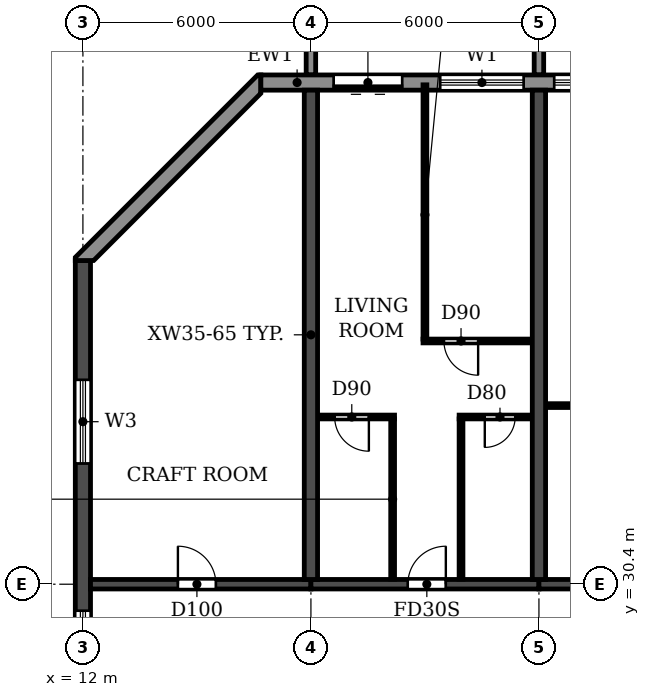
"""IFC4 building model, lengths in metres.
Left out: names, types, materials, properties, quantities, classifications, styles, units other than length and angle.
Written with IfcOpenShell. Run it as: python <this file> out.ifc"""

import sys

from ifc_helpers import new_model, si_unit, direction, frame, frame_2d, origin, place, context, subcontext, project, spatial, polyline, rectangle, outline, extrude, source, transform, mapped, element, fill, save


model = new_model("IFC4")
c1 = context("Model", 3, precision=1e-05, world=origin(), true_north=direction((0.0, 1.0)))
c2 = subcontext(c1, "Body", "Model", "MODEL_VIEW")
j1 = project(units=[si_unit("LENGTHUNIT", "METRE"), si_unit("PLANEANGLEUNIT", "RADIAN")], contexts=[c1])
p1 = place(None, origin())
s1 = spatial("IfcSite", under=j1, at=p1, CompositionType="ELEMENT")
p2 = place(p1, origin())
s2 = spatial("IfcBuilding", under=s1, at=p2, CompositionType="ELEMENT")
p3 = place(p2, frame((0.0, 0.0, 109.2)))
s3 = spatial("IfcBuildingStorey", under=s2, at=p3, CompositionType="ELEMENT", Elevation=109.2)
for number, where, z_axis, x_axis in (
    (1, (18.0, 30.525, 0.0), (0.0, 0.0, 1.0), (0.0, 1.0, 0.0)),
    (2, (24.0, 30.525, 0.0), (0.0, 0.0, 1.0), (0.0, 1.0, 0.0)),
):
    element("IfcWall", number, at=place(p3, frame(where, z_axis=z_axis, x_axis=x_axis)), inside=s3, PredefinedType="SHEAR", context=c2, shape_type="SweptSolid", body=[
        extrude(rectangle(XDim=12.875, YDim=0.35, at=frame_2d((6.438, 0.0))), origin(), (0.0, 0.0, 1.0), 3.06),
    ])
p4 = place(p3, frame((12.0, 4.683, 0.0), z_axis=(0.0, 0.0, 1.0), x_axis=(0.0, 1.0, 0.0)))
e3 = element("IfcWall", 3, at=p4, inside=s3, PredefinedType="SHEAR", context=c2, shape_type="SweptSolid", body=[
    extrude(rectangle(XDim=34.234, YDim=0.4, at=frame_2d((17.117, 0.0))), origin(), (0.0, 0.0, 1.0), 3.06),
])
p5 = place(p4, frame((23.817, 0.0, 0.9)))
e4 = element("IfcOpeningElement", 4, at=p5, cuts=e3, PredefinedType="OPENING", context=c2, shape_type="SweptSolid", body=[
    extrude(rectangle(XDim=1.2, YDim=1.5, at=frame_2d((0.6, 0.75))), frame((0.0, 0.21, 0.0), z_axis=(0.0, -1.0, 0.0), x_axis=(1.0, 0.0, 0.0)), (0.0, 0.0, 1.0), 0.42),
])
p6 = place(p4, frame((8.017, 0.0, 0.9)))
e5 = element("IfcOpeningElement", 5, at=p6, cuts=e3, PredefinedType="OPENING", context=c2, shape_type="SweptSolid", body=[
    extrude(rectangle(XDim=1.2, YDim=1.5, at=frame_2d((0.6, 0.75))), frame((0.0, 0.21, 0.0), z_axis=(0.0, -1.0, 0.0), x_axis=(1.0, 0.0, 0.0)), (0.0, 0.0, 1.0), 0.42),
])
p7 = place(p4, frame((15.917, 0.0, 0.9)))
e6 = element("IfcOpeningElement", 6, at=p7, cuts=e3, PredefinedType="OPENING", context=c2, shape_type="SweptSolid", body=[
    extrude(rectangle(XDim=1.2, YDim=1.5, at=frame_2d((0.6, 0.75))), frame((0.0, 0.21, 0.0), z_axis=(0.0, -1.0, 0.0), x_axis=(1.0, 0.0, 0.0)), (0.0, 0.0, 1.0), 0.42),
])
p8 = place(p4, frame((28.894, 0.0, 0.6)))
e7 = element("IfcOpeningElement", 7, at=p8, cuts=e3, PredefinedType="OPENING", context=c2, shape_type="SweptSolid", body=[
    extrude(rectangle(XDim=2.2, YDim=1.8, at=frame_2d((1.1, 0.9))), frame((0.0, 0.21, 0.0), z_axis=(0.0, -1.0, 0.0), x_axis=(1.0, 0.0, 0.0)), (0.0, 0.0, 1.0), 0.42),
])
p9 = place(p4, frame((2.541, 0.0, 0.6)))
e8 = element("IfcOpeningElement", 8, at=p9, cuts=e3, PredefinedType="OPENING", context=c2, shape_type="SweptSolid", body=[
    extrude(rectangle(XDim=2.2, YDim=1.8, at=frame_2d((1.1, 0.9))), frame((0.0, 0.21, 0.0), z_axis=(0.0, -1.0, 0.0), x_axis=(1.0, 0.0, 0.0)), (0.0, 0.0, 1.0), 0.42),
])
p10 = place(p3, frame((12.2, 30.4, 0.0), z_axis=(0.0, 0.0, 1.0), x_axis=(1.0, 0.0, 0.0)))
e9 = element("IfcWall", 9, at=p10, inside=s3, PredefinedType="SHEAR", context=c2, shape_type="SweptSolid", body=[
    extrude(rectangle(XDim=5.8, YDim=0.25, at=frame_2d((2.9, 0.0))), origin(), (0.0, 0.0, 1.0), 2.46),
])
p11 = place(p10, frame((2.3, 0.0, 0.0)))
e10 = element("IfcOpeningElement", 10, at=p11, cuts=e9, PredefinedType="OPENING", context=c2, shape_type="SweptSolid", body=[
    extrude(rectangle(XDim=1.0, YDim=2.1, at=frame_2d((0.5, 1.05))), frame((0.0, 0.135, 0.0), z_axis=(0.0, -1.0, 0.0), x_axis=(1.0, 0.0, 0.0)), (0.0, 0.0, 1.0), 0.27),
])
p12 = place(p3, frame((18.0, 30.4, 0.0), z_axis=(0.0, 0.0, 1.0), x_axis=(1.0, 0.0, 0.0)))
e11 = element("IfcWall", 11, at=p12, inside=s3, PredefinedType="SHEAR", context=c2, shape_type="SweptSolid", body=[
    extrude(rectangle(XDim=6.0, YDim=0.25, at=frame_2d((3.0, 0.0))), origin(), (0.0, 0.0, 1.0), 2.46),
])
p13 = place(p12, frame((2.55, 0.0, 0.0)))
e12 = element("IfcOpeningElement", 12, at=p13, cuts=e11, PredefinedType="OPENING", context=c2, shape_type="SweptSolid", body=[
    extrude(rectangle(XDim=1.0, YDim=2.1, at=frame_2d((0.5, 1.05))), frame((0.0, 0.135, 0.0), z_axis=(0.0, -1.0, 0.0), x_axis=(1.0, 0.0, 0.0)), (0.0, 0.0, 1.0), 0.27),
])
p14 = place(p3, frame((24.0, 30.4, 0.0), z_axis=(0.0, 0.0, 1.0), x_axis=(1.0, 0.0, 0.0)))
e13 = element("IfcWall", 13, at=p14, inside=s3, PredefinedType="SHEAR", context=c2, shape_type="SweptSolid", body=[
    extrude(rectangle(XDim=6.0, YDim=0.25, at=frame_2d((3.0, 0.0))), origin(), (0.0, 0.0, 1.0), 2.46),
])
p15 = place(p14, frame((2.55, 0.0, 0.0)))
e14 = element("IfcOpeningElement", 14, at=p15, cuts=e13, PredefinedType="OPENING", context=c2, shape_type="SweptSolid", body=[
    extrude(rectangle(XDim=1.0, YDim=2.1, at=frame_2d((0.5, 1.05))), frame((0.0, 0.135, 0.0), z_axis=(0.0, -1.0, 0.0), x_axis=(1.0, 0.0, 0.0)), (0.0, 0.0, 1.0), 0.27),
])
p16 = place(p3, frame((85.317, 43.6, 0.0), z_axis=(0.0, 0.0, 1.0), x_axis=(-1.0, 0.0, 0.0)))
e15 = element("IfcWall", 15, at=p16, inside=s3, PredefinedType="STANDARD", context=c2, shape_type="SweptSolid", body=[
    extrude(rectangle(XDim=68.634, YDim=0.4, at=frame_2d((34.317, 0.0))), origin(), (0.0, 0.0, 1.0), 3.06),
])
p17 = place(p16, frame((64.917, 0.0, 0.0)))
e16 = element("IfcOpeningElement", 16, at=p17, cuts=e15, PredefinedType="OPENING", context=c2, shape_type="SweptSolid", body=[
    extrude(rectangle(XDim=1.8, YDim=2.4, at=frame_2d((0.9, 1.2))), frame((0.0, 0.21, 0.0), z_axis=(0.0, -1.0, 0.0), x_axis=(1.0, 0.0, 0.0)), (0.0, 0.0, 1.0), 0.42),
])
p18 = place(p16, frame((61.717, 0.0, 0.9)))
e17 = element("IfcOpeningElement", 17, at=p18, cuts=e15, PredefinedType="OPENING", context=c2, shape_type="SweptSolid", body=[
    extrude(rectangle(XDim=2.2, YDim=1.5, at=frame_2d((1.1, 0.75))), frame((0.0, 0.21, 0.0), z_axis=(0.0, -1.0, 0.0), x_axis=(1.0, 0.0, 0.0)), (0.0, 0.0, 1.0), 0.42),
])
p19 = place(p16, frame((58.717, 0.0, 0.9)))
e18 = element("IfcOpeningElement", 18, at=p19, cuts=e15, PredefinedType="OPENING", context=c2, shape_type="SweptSolid", body=[
    extrude(rectangle(XDim=2.2, YDim=1.5, at=frame_2d((1.1, 0.75))), frame((0.0, 0.21, 0.0), z_axis=(0.0, -1.0, 0.0), x_axis=(1.0, 0.0, 0.0)), (0.0, 0.0, 1.0), 0.42),
])
p20 = place(p16, frame((55.917, 0.0, 0.0)))
e19 = element("IfcOpeningElement", 19, at=p20, cuts=e15, PredefinedType="OPENING", context=c2, shape_type="SweptSolid", body=[
    extrude(rectangle(XDim=1.8, YDim=2.4, at=frame_2d((0.9, 1.2))), frame((0.0, 0.21, 0.0), z_axis=(0.0, -1.0, 0.0), x_axis=(1.0, 0.0, 0.0)), (0.0, 0.0, 1.0), 0.42),
])
p21 = place(p16, frame((52.917, 0.0, 0.0)))
e20 = element("IfcOpeningElement", 20, at=p21, cuts=e15, PredefinedType="OPENING", context=c2, shape_type="SweptSolid", body=[
    extrude(rectangle(XDim=1.8, YDim=2.4, at=frame_2d((0.9, 1.2))), frame((0.0, 0.21, 0.0), z_axis=(0.0, -1.0, 0.0), x_axis=(1.0, 0.0, 0.0)), (0.0, 0.0, 1.0), 0.42),
])
p22 = place(p16, frame((49.717, 0.0, 0.9)))
e21 = element("IfcOpeningElement", 21, at=p22, cuts=e15, PredefinedType="OPENING", context=c2, shape_type="SweptSolid", body=[
    extrude(rectangle(XDim=2.2, YDim=1.5, at=frame_2d((1.1, 0.75))), frame((0.0, 0.21, 0.0), z_axis=(0.0, -1.0, 0.0), x_axis=(1.0, 0.0, 0.0)), (0.0, 0.0, 1.0), 0.42),
])
p23 = place(p16, frame((46.717, 0.0, 0.9)))
e22 = element("IfcOpeningElement", 22, at=p23, cuts=e15, PredefinedType="OPENING", context=c2, shape_type="SweptSolid", body=[
    extrude(rectangle(XDim=2.2, YDim=1.5, at=frame_2d((1.1, 0.75))), frame((0.0, 0.21, 0.0), z_axis=(0.0, -1.0, 0.0), x_axis=(1.0, 0.0, 0.0)), (0.0, 0.0, 1.0), 0.42),
])
p24 = place(p16, frame((43.917, 0.0, 0.0)))
e23 = element("IfcOpeningElement", 23, at=p24, cuts=e15, PredefinedType="OPENING", context=c2, shape_type="SweptSolid", body=[
    extrude(rectangle(XDim=1.8, YDim=2.4, at=frame_2d((0.9, 1.2))), frame((0.0, 0.21, 0.0), z_axis=(0.0, -1.0, 0.0), x_axis=(1.0, 0.0, 0.0)), (0.0, 0.0, 1.0), 0.42),
])
p25 = place(p16, frame((40.717, 0.0, 0.9)))
e24 = element("IfcOpeningElement", 24, at=p25, cuts=e15, PredefinedType="OPENING", context=c2, shape_type="SweptSolid", body=[
    extrude(rectangle(XDim=2.2, YDim=1.5, at=frame_2d((1.1, 0.75))), frame((0.0, 0.21, 0.0), z_axis=(0.0, -1.0, 0.0), x_axis=(1.0, 0.0, 0.0)), (0.0, 0.0, 1.0), 0.42),
])
p26 = place(p16, frame((37.717, 0.0, 0.9)))
e25 = element("IfcOpeningElement", 25, at=p26, cuts=e15, PredefinedType="OPENING", context=c2, shape_type="SweptSolid", body=[
    extrude(rectangle(XDim=2.2, YDim=1.5, at=frame_2d((1.1, 0.75))), frame((0.0, 0.21, 0.0), z_axis=(0.0, -1.0, 0.0), x_axis=(1.0, 0.0, 0.0)), (0.0, 0.0, 1.0), 0.42),
])
p27 = place(p16, frame((34.917, 0.0, 0.0)))
e26 = element("IfcOpeningElement", 26, at=p27, cuts=e15, PredefinedType="OPENING", context=c2, shape_type="SweptSolid", body=[
    extrude(rectangle(XDim=1.8, YDim=2.4, at=frame_2d((0.9, 1.2))), frame((0.0, 0.21, 0.0), z_axis=(0.0, -1.0, 0.0), x_axis=(1.0, 0.0, 0.0)), (0.0, 0.0, 1.0), 0.42),
])
p28 = place(p16, frame((31.717, 0.0, 0.9)))
e27 = element("IfcOpeningElement", 27, at=p28, cuts=e15, PredefinedType="OPENING", context=c2, shape_type="SweptSolid", body=[
    extrude(rectangle(XDim=2.2, YDim=1.5, at=frame_2d((1.1, 0.75))), frame((0.0, 0.21, 0.0), z_axis=(0.0, -1.0, 0.0), x_axis=(1.0, 0.0, 0.0)), (0.0, 0.0, 1.0), 0.42),
])
p29 = place(p16, frame((28.917, 0.0, 0.0)))
e28 = element("IfcOpeningElement", 28, at=p29, cuts=e15, PredefinedType="OPENING", context=c2, shape_type="SweptSolid", body=[
    extrude(rectangle(XDim=1.8, YDim=2.4, at=frame_2d((0.9, 1.2))), frame((0.0, 0.21, 0.0), z_axis=(0.0, -1.0, 0.0), x_axis=(1.0, 0.0, 0.0)), (0.0, 0.0, 1.0), 0.42),
])
p30 = place(p16, frame((25.717, 0.0, 0.9)))
e29 = element("IfcOpeningElement", 29, at=p30, cuts=e15, PredefinedType="OPENING", context=c2, shape_type="SweptSolid", body=[
    extrude(rectangle(XDim=2.2, YDim=1.5, at=frame_2d((1.1, 0.75))), frame((0.0, 0.21, 0.0), z_axis=(0.0, -1.0, 0.0), x_axis=(1.0, 0.0, 0.0)), (0.0, 0.0, 1.0), 0.42),
])
p31 = place(p16, frame((22.717, 0.0, 0.9)))
e30 = element("IfcOpeningElement", 30, at=p31, cuts=e15, PredefinedType="OPENING", context=c2, shape_type="SweptSolid", body=[
    extrude(rectangle(XDim=2.2, YDim=1.5, at=frame_2d((1.1, 0.75))), frame((0.0, 0.21, 0.0), z_axis=(0.0, -1.0, 0.0), x_axis=(1.0, 0.0, 0.0)), (0.0, 0.0, 1.0), 0.42),
])
p32 = place(p16, frame((19.917, 0.0, 0.0)))
e31 = element("IfcOpeningElement", 31, at=p32, cuts=e15, PredefinedType="OPENING", context=c2, shape_type="SweptSolid", body=[
    extrude(rectangle(XDim=1.8, YDim=2.4, at=frame_2d((0.9, 1.2))), frame((0.0, 0.21, 0.0), z_axis=(0.0, -1.0, 0.0), x_axis=(1.0, 0.0, 0.0)), (0.0, 0.0, 1.0), 0.42),
])
p33 = place(p16, frame((16.717, 0.0, 0.9)))
e32 = element("IfcOpeningElement", 32, at=p33, cuts=e15, PredefinedType="OPENING", context=c2, shape_type="SweptSolid", body=[
    extrude(rectangle(XDim=2.2, YDim=1.5, at=frame_2d((1.1, 0.75))), frame((0.0, 0.21, 0.0), z_axis=(0.0, -1.0, 0.0), x_axis=(1.0, 0.0, 0.0)), (0.0, 0.0, 1.0), 0.42),
])
p34 = place(p16, frame((13.917, 0.0, 0.0)))
e33 = element("IfcOpeningElement", 33, at=p34, cuts=e15, PredefinedType="OPENING", context=c2, shape_type="SweptSolid", body=[
    extrude(rectangle(XDim=1.8, YDim=2.4, at=frame_2d((0.9, 1.2))), frame((0.0, 0.21, 0.0), z_axis=(0.0, -1.0, 0.0), x_axis=(1.0, 0.0, 0.0)), (0.0, 0.0, 1.0), 0.42),
])
p35 = place(p16, frame((10.717, 0.0, 0.9)))
e34 = element("IfcOpeningElement", 34, at=p35, cuts=e15, PredefinedType="OPENING", context=c2, shape_type="SweptSolid", body=[
    extrude(rectangle(XDim=2.2, YDim=1.5, at=frame_2d((1.1, 0.75))), frame((0.0, 0.21, 0.0), z_axis=(0.0, -1.0, 0.0), x_axis=(1.0, 0.0, 0.0)), (0.0, 0.0, 1.0), 0.42),
])
p36 = place(p16, frame((7.717, 0.0, 0.9)))
e35 = element("IfcOpeningElement", 35, at=p36, cuts=e15, PredefinedType="OPENING", context=c2, shape_type="SweptSolid", body=[
    extrude(rectangle(XDim=2.2, YDim=1.5, at=frame_2d((1.1, 0.75))), frame((0.0, 0.21, 0.0), z_axis=(0.0, -1.0, 0.0), x_axis=(1.0, 0.0, 0.0)), (0.0, 0.0, 1.0), 0.42),
])
p37 = place(p16, frame((4.917, 0.0, 0.0)))
e36 = element("IfcOpeningElement", 36, at=p37, cuts=e15, PredefinedType="OPENING", context=c2, shape_type="SweptSolid", body=[
    extrude(rectangle(XDim=1.8, YDim=2.4, at=frame_2d((0.9, 1.2))), frame((0.0, 0.21, 0.0), z_axis=(0.0, -1.0, 0.0), x_axis=(1.0, 0.0, 0.0)), (0.0, 0.0, 1.0), 0.42),
])
p38 = place(p16, frame((1.717, 0.0, 0.9)))
e37 = element("IfcOpeningElement", 37, at=p38, cuts=e15, PredefinedType="OPENING", context=c2, shape_type="SweptSolid", body=[
    extrude(rectangle(XDim=2.2, YDim=1.5, at=frame_2d((1.1, 0.75))), frame((0.0, 0.21, 0.0), z_axis=(0.0, -1.0, 0.0), x_axis=(1.0, 0.0, 0.0)), (0.0, 0.0, 1.0), 0.42),
])
p39 = place(p3, origin())
e38 = element("IfcWall", 38, at=p39, inside=s3, PredefinedType="STANDARD", context=c2, shape_type="SweptSolid", body=[
    extrude(outline(polyline([(16.683, 43.8), (16.6, 43.8), (11.8, 39.0), (11.8, 38.917), (12.283, 38.917), (16.683, 43.317), (16.683, 43.8)])), origin(), (0.0, 0.0, 1.0), 3.06),
])
m1 = source(origin(), c2, "Body", "SweptSolid", [
    extrude(outline(polyline([(0.0, 0.0), (0.25, 0.0), (0.25, 3.1), (0.0, 3.1), (0.0, 0.0)])), origin(), (0.0, 0.0, 1.0), 3.1),
])
for number, where in (
    (39, (17.875, 43.8, 0.0)),
    (40, (23.875, 43.8, 0.0)),
):
    element("IfcWall", number, at=place(p3, frame(where)), inside=s3, PredefinedType="STANDARD", context=c2, shape_type="MappedRepresentation", body=[
        mapped(m1, transform((0.0, 0.0, 0.0))),
    ])
p40 = place(p3, frame((18.185, 34.8, 0.0), z_axis=(0.0, 0.0, 1.0), x_axis=(1.0, 0.0, 0.0)))
e41 = element("IfcWall", 41, at=p40, inside=s3, PredefinedType="PARTITIONING", context=c2, shape_type="SweptSolid", body=[
    extrude(rectangle(XDim=2.015, YDim=0.1, at=frame_2d((1.007, 0.0))), origin(), (0.0, 0.0, 1.0), 3.06),
])
p41 = place(p40, frame((0.44, 0.0, 0.0)))
e42 = element("IfcOpeningElement", 42, at=p41, cuts=e41, PredefinedType="OPENING", context=c2, shape_type="SweptSolid", body=[
    extrude(rectangle(XDim=0.9, YDim=2.1, at=frame_2d((0.45, 1.05))), frame((0.0, 0.06, 0.0), z_axis=(0.0, -1.0, 0.0), x_axis=(1.0, 0.0, 0.0)), (0.0, 0.0, 1.0), 0.12),
])
p42 = place(p3, frame((21.9, 34.8, 0.0), z_axis=(0.0, 0.0, 1.0), x_axis=(1.0, 0.0, 0.0)))
e43 = element("IfcWall", 43, at=p42, inside=s3, PredefinedType="PARTITIONING", context=c2, shape_type="SweptSolid", body=[
    extrude(rectangle(XDim=1.915, YDim=0.1, at=frame_2d((0.958, 0.0))), origin(), (0.0, 0.0, 1.0), 3.06),
])
p43 = place(p42, frame((0.675, 0.0, 0.0)))
e44 = element("IfcOpeningElement", 44, at=p43, cuts=e43, PredefinedType="OPENING", context=c2, shape_type="SweptSolid", body=[
    extrude(rectangle(XDim=0.8, YDim=2.1, at=frame_2d((0.4, 1.05))), frame((0.0, 0.06, 0.0), z_axis=(0.0, -1.0, 0.0), x_axis=(1.0, 0.0, 0.0)), (0.0, 0.0, 1.0), 0.12),
])
p44 = place(p3, frame((24.185, 35.1, 0.0), z_axis=(0.0, 0.0, 1.0), x_axis=(1.0, 0.0, 0.0)))
e45 = element("IfcWall", 45, at=p44, inside=s3, PredefinedType="PARTITIONING", context=c2, shape_type="SweptSolid", body=[
    extrude(rectangle(XDim=2.015, YDim=0.1, at=frame_2d((1.007, 0.0))), origin(), (0.0, 0.0, 1.0), 3.06),
])
p45 = place(p3, frame((20.95, 36.8, 0.0), z_axis=(0.0, 0.0, 1.0), x_axis=(1.0, 0.0, 0.0)))
e46 = element("IfcWall", 46, at=p45, inside=s3, PredefinedType="PARTITIONING", context=c2, shape_type="SweptSolid", body=[
    extrude(rectangle(XDim=2.865, YDim=0.1, at=frame_2d((1.433, 0.0))), origin(), (0.0, 0.0, 1.0), 3.06),
])
p46 = place(p45, frame((0.55, 0.0, 0.0)))
e47 = element("IfcOpeningElement", 47, at=p46, cuts=e46, PredefinedType="OPENING", context=c2, shape_type="SweptSolid", body=[
    extrude(rectangle(XDim=0.9, YDim=2.1, at=frame_2d((0.45, 1.05))), frame((0.0, 0.06, 0.0), z_axis=(0.0, -1.0, 0.0), x_axis=(1.0, 0.0, 0.0)), (0.0, 0.0, 1.0), 0.12),
])
p47 = place(p3, frame((20.15, 30.535, 0.0), z_axis=(0.0, 0.0, 1.0), x_axis=(0.0, 1.0, 0.0)))
e48 = element("IfcWall", 48, at=p47, inside=s3, PredefinedType="PARTITIONING", context=c2, shape_type="SweptSolid", body=[
    extrude(rectangle(XDim=4.215, YDim=0.1, at=frame_2d((2.107, 0.0))), origin(), (0.0, 0.0, 1.0), 3.06),
])
p48 = place(p3, frame((21.0, 36.85, 0.0), z_axis=(0.0, 0.0, 1.0), x_axis=(0.0, 1.0, 0.0)))
e49 = element("IfcWall", 49, at=p48, inside=s3, PredefinedType="PARTITIONING", context=c2, shape_type="SweptSolid", body=[
    extrude(rectangle(XDim=6.69, YDim=0.1, at=frame_2d((3.345, 0.0))), origin(), (0.0, 0.0, 1.0), 3.06),
])
p49 = place(p3, frame((21.95, 30.535, 0.0), z_axis=(0.0, 0.0, 1.0), x_axis=(0.0, 1.0, 0.0)))
e50 = element("IfcWall", 50, at=p49, inside=s3, PredefinedType="PARTITIONING", context=c2, shape_type="SweptSolid", body=[
    extrude(rectangle(XDim=4.215, YDim=0.1, at=frame_2d((2.107, 0.0))), origin(), (0.0, 0.0, 1.0), 3.06),
])
p50 = place(p17, origin())
e51 = element("IfcDoor", 51, at=p50, inside=s3, OperationType="DOUBLE_DOOR_SLIDING", PredefinedType="DOOR", context=c2, shape_type="SweptSolid", body=[
    extrude(rectangle(XDim=1.8, YDim=2.4, at=frame_2d((0.9, 1.2))), frame((0.0, 0.025, 0.0), z_axis=(0.0, -1.0, 0.0), x_axis=(1.0, 0.0, 0.0)), (0.0, 0.0, 1.0), 0.05),
])
fill(e16, e51)
p51 = place(p18, origin())
e52 = element("IfcWindow", 52, at=p51, inside=s3, PartitioningType="DOUBLE_PANEL_HORIZONTAL", PredefinedType="WINDOW", context=c2, shape_type="SweptSolid", body=[
    extrude(rectangle(XDim=2.2, YDim=1.5, at=frame_2d((1.1, 0.75))), frame((0.0, 0.03, 0.0), z_axis=(0.0, -1.0, 0.0), x_axis=(1.0, 0.0, 0.0)), (0.0, 0.0, 1.0), 0.06),
])
fill(e17, e52)
p52 = place(p19, origin())
e53 = element("IfcWindow", 53, at=p52, inside=s3, PartitioningType="DOUBLE_PANEL_HORIZONTAL", PredefinedType="WINDOW", context=c2, shape_type="SweptSolid", body=[
    extrude(rectangle(XDim=2.2, YDim=1.5, at=frame_2d((1.1, 0.75))), frame((0.0, 0.03, 0.0), z_axis=(0.0, -1.0, 0.0), x_axis=(1.0, 0.0, 0.0)), (0.0, 0.0, 1.0), 0.06),
])
fill(e18, e53)
p53 = place(p5, origin())
e54 = element("IfcWindow", 54, at=p53, inside=s3, PartitioningType="SINGLE_PANEL", PredefinedType="WINDOW", context=c2, shape_type="SweptSolid", body=[
    extrude(rectangle(XDim=1.2, YDim=1.5, at=frame_2d((0.6, 0.75))), frame((0.0, 0.03, 0.0), z_axis=(0.0, -1.0, 0.0), x_axis=(1.0, 0.0, 0.0)), (0.0, 0.0, 1.0), 0.06),
])
fill(e4, e54)
p54 = place(p8, origin())
e55 = element("IfcWindow", 55, at=p54, inside=s3, PartitioningType="DOUBLE_PANEL_HORIZONTAL", PredefinedType="WINDOW", context=c2, shape_type="SweptSolid", body=[
    extrude(rectangle(XDim=2.2, YDim=1.8, at=frame_2d((1.1, 0.9))), frame((0.0, 0.03, 0.0), z_axis=(0.0, -1.0, 0.0), x_axis=(1.0, 0.0, 0.0)), (0.0, 0.0, 1.0), 0.06),
])
fill(e7, e55)
p55 = place(p11, origin())
e56 = element("IfcDoor", 56, at=p55, inside=s3, OperationType="SINGLE_SWING_LEFT", PredefinedType="DOOR", context=c2, shape_type="SweptSolid", body=[
    extrude(rectangle(XDim=1.0, YDim=2.1, at=frame_2d((0.5, 1.05))), frame((0.0, 0.025, 0.0), z_axis=(0.0, -1.0, 0.0), x_axis=(1.0, 0.0, 0.0)), (0.0, 0.0, 1.0), 0.05),
])
fill(e10, e56)
p56 = place(p41, frame((0.9, 0.0, 0.0), z_axis=(0.0, 0.0, 1.0), x_axis=(-1.0, 0.0, 0.0)))
e57 = element("IfcDoor", 57, at=p56, inside=s3, OperationType="SINGLE_SWING_LEFT", PredefinedType="DOOR", context=c2, shape_type="SweptSolid", body=[
    extrude(rectangle(XDim=0.9, YDim=2.1, at=frame_2d((0.45, 1.05))), frame((0.0, 0.025, 0.0), z_axis=(0.0, -1.0, 0.0), x_axis=(1.0, 0.0, 0.0)), (0.0, 0.0, 1.0), 0.05),
])
fill(e42, e57)
p57 = place(p13, origin())
e58 = element("IfcDoor", 58, at=p57, inside=s3, OperationType="SINGLE_SWING_RIGHT", PredefinedType="DOOR", context=c2, shape_type="SweptSolid", body=[
    extrude(rectangle(XDim=1.0, YDim=2.1, at=frame_2d((0.5, 1.05))), frame((0.0, 0.025, 0.0), z_axis=(0.0, -1.0, 0.0), x_axis=(1.0, 0.0, 0.0)), (0.0, 0.0, 1.0), 0.05),
])
fill(e12, e58)
p58 = place(p46, frame((0.9, 0.0, 0.0), z_axis=(0.0, 0.0, 1.0), x_axis=(-1.0, 0.0, 0.0)))
e59 = element("IfcDoor", 59, at=p58, inside=s3, OperationType="SINGLE_SWING_LEFT", PredefinedType="DOOR", context=c2, shape_type="SweptSolid", body=[
    extrude(rectangle(XDim=0.9, YDim=2.1, at=frame_2d((0.45, 1.05))), frame((0.0, 0.025, 0.0), z_axis=(0.0, -1.0, 0.0), x_axis=(1.0, 0.0, 0.0)), (0.0, 0.0, 1.0), 0.05),
])
fill(e47, e59)
p59 = place(p43, frame((0.8, 0.0, 0.0), z_axis=(0.0, 0.0, 1.0), x_axis=(-1.0, 0.0, 0.0)))
e60 = element("IfcDoor", 60, at=p59, inside=s3, OperationType="SINGLE_SWING_RIGHT", PredefinedType="DOOR", context=c2, shape_type="SweptSolid", body=[
    extrude(rectangle(XDim=0.8, YDim=2.1, at=frame_2d((0.4, 1.05))), frame((0.0, 0.025, 0.0), z_axis=(0.0, -1.0, 0.0), x_axis=(1.0, 0.0, 0.0)), (0.0, 0.0, 1.0), 0.05),
])
fill(e44, e60)
save(model, sys.argv[1])
